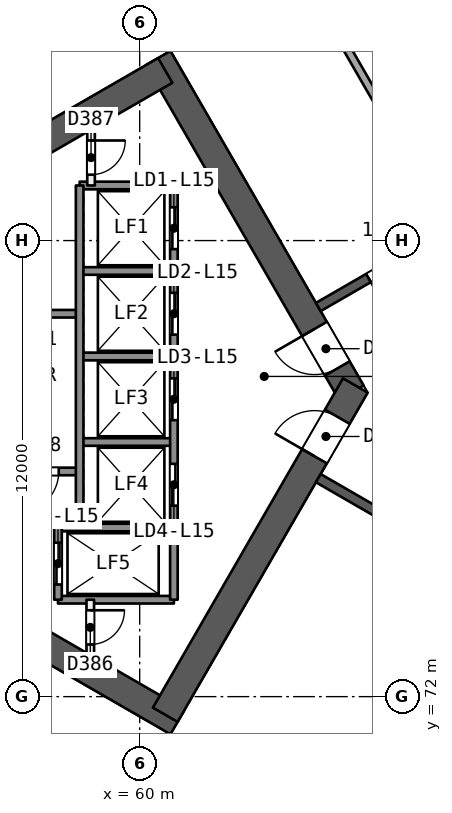
"""IFC4 building model, lengths in metres.
Left out: names, types, materials, properties, quantities, classifications, styles, units other than length and angle.
Written with IfcOpenShell. Run it as: python <this file> out.ifc"""

import sys

from ifc_helpers import new_model, si_unit, direction, frame, frame_2d, origin, place, context, subcontext, project, spatial, rectangle, extrude, element, fill, save


model = new_model("IFC4")
c1 = context("Model", 3, precision=1e-05, world=origin(), true_north=direction((0.0, 1.0)))
c2 = subcontext(c1, "Body", "Model", "MODEL_VIEW")
j1 = project(units=[si_unit("LENGTHUNIT", "METRE"), si_unit("PLANEANGLEUNIT", "RADIAN")], contexts=[c1])
p1 = place(None, origin())
s1 = spatial("IfcSite", under=j1, at=p1, CompositionType="ELEMENT")
p2 = place(p1, origin())
s2 = spatial("IfcBuilding", under=s1, at=p2, CompositionType="ELEMENT")
p3 = place(p2, frame((0.0, 0.0, 68.4)))
s3 = spatial("IfcBuildingStorey", under=s2, at=p3, CompositionType="ELEMENT", Elevation=68.4)
p4 = place(p3, frame((65.567, 80.0, 0.0), z_axis=(0.0, 0.0, 1.0), x_axis=(-0.499988615364, 0.866031976607, 0.0)))
e1 = element("IfcWall", 1, at=p4, inside=s3, PredefinedType="SHEAR", context=c2, shape_type="SweptSolid", body=[
    extrude(rectangle(XDim=10.163, YDim=0.75, at=frame_2d((5.082, 0.0))), origin(), (0.0, 0.0, 1.0), 3.7),
])
p5 = place(p4, frame((0.733, 0.0, 0.0)))
e2 = element("IfcOpeningElement", 2, at=p5, cuts=e1, PredefinedType="OPENING", context=c2, shape_type="SweptSolid", body=[
    extrude(rectangle(XDim=1.2, YDim=2.1, at=frame_2d((0.6, 1.05))), frame((0.0, 0.385, 0.0), z_axis=(0.0, -1.0, 0.0), x_axis=(1.0, 0.0, 0.0)), (0.0, 0.0, 1.0), 0.771),
])
p6 = place(p3, frame((60.673, 88.477, 0.0), z_axis=(0.0, 0.0, 1.0), x_axis=(-0.8660248072, -0.500001033313, 0.0)))
e3 = element("IfcWall", 3, at=p6, inside=s3, PredefinedType="SHEAR", context=c2, shape_type="SweptSolid", body=[
    extrude(rectangle(XDim=13.958, YDim=0.75, at=frame_2d((6.979, 0.0))), origin(), (0.0, 0.0, 1.0), 3.7),
])
p7 = place(p3, frame((48.772, 78.394, 0.0), z_axis=(0.0, 0.0, 1.0), x_axis=(0.866028339916, -0.499994914436, 0.0)))
e4 = element("IfcWall", 4, at=p7, inside=s3, PredefinedType="SHEAR", context=c2, shape_type="SweptSolid", body=[
    extrude(rectangle(XDim=14.117, YDim=0.75, at=frame_2d((7.059, 0.0))), origin(), (0.0, 0.0, 1.0), 3.7),
])
p8 = place(p3, frame((60.673, 71.523, 0.0), z_axis=(0.0, 0.0, 1.0), x_axis=(0.499997052475, 0.866027105532, 0.0)))
e5 = element("IfcWall", 5, at=p8, inside=s3, PredefinedType="SHEAR", context=c2, shape_type="SweptSolid", body=[
    extrude(rectangle(XDim=10.005, YDim=0.75, at=frame_2d((5.002, 0.0))), origin(), (0.0, 0.0, 1.0), 3.7),
])
p9 = place(p8, frame((7.855, 0.0, 0.0)))
e6 = element("IfcOpeningElement", 6, at=p9, cuts=e5, PredefinedType="OPENING", context=c2, shape_type="SweptSolid", body=[
    extrude(rectangle(XDim=1.2, YDim=2.1, at=frame_2d((0.6, 1.05))), frame((0.0, 0.385, 0.0), z_axis=(0.0, -1.0, 0.0), x_axis=(1.0, 0.0, 0.0)), (0.0, 0.0, 1.0), 0.771),
])
p10 = place(p3, frame((78.2, 90.046, 0.0), z_axis=(0.0, 0.0, 1.0), x_axis=(-0.866026492143, -0.499998114903, 0.0)))
e7 = element("IfcWall", 7, at=p10, inside=s3, PredefinedType="SHEAR", context=c2, shape_type="SweptSolid", body=[
    extrude(rectangle(XDim=15.588, YDim=0.25, at=frame_2d((7.794, 0.0))), origin(), (0.0, 0.0, 1.0), 3.2),
])
p11 = place(p10, frame((4.718, 0.0, 0.0)))
e8 = element("IfcOpeningElement", 8, at=p11, cuts=e7, PredefinedType="OPENING", context=c2, shape_type="SweptSolid", body=[
    extrude(rectangle(XDim=1.0, YDim=2.1, at=frame_2d((0.5, 1.05))), frame((0.0, 0.135, 0.0), z_axis=(0.0, -1.0, 0.0), x_axis=(1.0, 0.0, 0.0)), (0.0, 0.0, 1.0), 0.271),
])
p12 = place(p10, frame((9.785, 0.0, 0.0)))
e9 = element("IfcOpeningElement", 9, at=p12, cuts=e7, PredefinedType="OPENING", context=c2, shape_type="SweptSolid", body=[
    extrude(rectangle(XDim=1.1, YDim=2.1, at=frame_2d((0.55, 1.05))), frame((0.0, 0.135, 0.0), z_axis=(0.0, -1.0, 0.0), x_axis=(1.0, 0.0, 0.0)), (0.0, 0.0, 1.0), 0.271),
])
p13 = place(p10, frame((13.062, 0.0, 0.0)))
e10 = element("IfcOpeningElement", 10, at=p13, cuts=e7, PredefinedType="OPENING", context=c2, shape_type="SweptSolid", body=[
    extrude(rectangle(XDim=1.0, YDim=2.1, at=frame_2d((0.5, 1.05))), frame((0.0, 0.135, 0.0), z_axis=(0.0, -1.0, 0.0), x_axis=(1.0, 0.0, 0.0)), (0.0, 0.0, 1.0), 0.271),
])
p14 = place(p3, frame((64.7, 77.748, 0.0), z_axis=(0.0, 0.0, 1.0), x_axis=(0.866026492143, -0.499998114903, 0.0)))
e11 = element("IfcWall", 11, at=p14, inside=s3, PredefinedType="SHEAR", context=c2, shape_type="SweptSolid", body=[
    extrude(rectangle(XDim=15.588, YDim=0.25, at=frame_2d((7.794, 0.0))), origin(), (0.0, 0.0, 1.0), 3.2),
])
p15 = place(p14, frame((2.306, 0.0, 0.0)))
e12 = element("IfcOpeningElement", 12, at=p15, cuts=e11, PredefinedType="OPENING", context=c2, shape_type="SweptSolid", body=[
    extrude(rectangle(XDim=1.0, YDim=2.1, at=frame_2d((0.5, 1.05))), frame((0.0, 0.135, 0.0), z_axis=(0.0, -1.0, 0.0), x_axis=(1.0, 0.0, 0.0)), (0.0, 0.0, 1.0), 0.271),
])
p16 = place(p14, frame((8.003, 0.0, 0.0)))
e13 = element("IfcOpeningElement", 13, at=p16, cuts=e11, PredefinedType="OPENING", context=c2, shape_type="SweptSolid", body=[
    extrude(rectangle(XDim=1.1, YDim=2.1, at=frame_2d((0.55, 1.05))), frame((0.0, 0.135, 0.0), z_axis=(0.0, -1.0, 0.0), x_axis=(1.0, 0.0, 0.0)), (0.0, 0.0, 1.0), 0.271),
])
p17 = place(p14, frame((9.871, 0.0, 0.0)))
e14 = element("IfcOpeningElement", 14, at=p17, cuts=e11, PredefinedType="OPENING", context=c2, shape_type="SweptSolid", body=[
    extrude(rectangle(XDim=1.0, YDim=2.1, at=frame_2d((0.5, 1.05))), frame((0.0, 0.135, 0.0), z_axis=(0.0, -1.0, 0.0), x_axis=(1.0, 0.0, 0.0)), (0.0, 0.0, 1.0), 0.271),
])
for number, where, z_axis, x_axis in (
    (15, (66.062, 98.599, 0.0), (0.0, 0.0, 1.0), (0.5, -0.866, 0.0)),
    (16, (61.472, 95.948, 0.0), (0.0, 0.0, 1.0), (0.5, -0.866, 0.0)),
):
    element("IfcWall", number, at=place(p3, frame(where, z_axis=z_axis, x_axis=x_axis)), inside=s3, PredefinedType="PARTITIONING", context=c2, shape_type="SweptSolid", body=[
        extrude(rectangle(XDim=13.476, YDim=0.2, at=frame_2d((6.738, 0.0))), origin(), (0.0, 0.0, 1.0), 3.2),
    ])
p18 = place(p3, frame((62.822, 63.272, 0.0), z_axis=(0.0, 0.0, 1.0), x_axis=(0.50001657107, 0.866015836261, 0.0)))
e17 = element("IfcWall", 17, at=p18, inside=s3, PredefinedType="PARTITIONING", context=c2, shape_type="SweptSolid", body=[
    extrude(rectangle(XDim=9.413, YDim=0.2, at=frame_2d((4.707, 0.0))), origin(), (0.0, 0.0, 1.0), 3.2),
])
p19 = place(p3, frame((66.062, 61.401, 0.0), z_axis=(0.0, 0.0, 1.0), x_axis=(0.500006826849, 0.866021462265, 0.0)))
e18 = element("IfcWall", 18, at=p19, inside=s3, PredefinedType="PARTITIONING", context=c2, shape_type="SweptSolid", body=[
    extrude(rectangle(XDim=13.476, YDim=0.2, at=frame_2d((6.738, 0.0))), origin(), (0.0, 0.0, 1.0), 3.2),
])
p20 = place(p3, frame((38.832, 83.049, 0.0), z_axis=(0.0, 0.0, 1.0), x_axis=(0.866024382485, 0.500001768939, 0.0)))
e19 = element("IfcWall", 19, at=p20, inside=s3, PredefinedType="SOLIDWALL", context=c2, shape_type="SweptSolid", body=[
    extrude(rectangle(XDim=59.596, YDim=0.3, at=frame_2d((29.798, 0.0))), origin(), (0.0, 0.0, 1.0), 3.2),
])
p21 = place(p20, frame((27.507, 0.0, 0.0)))
e20 = element("IfcOpeningElement", 20, at=p21, cuts=e19, PredefinedType="OPENING", context=c2, shape_type="SweptSolid", body=[
    extrude(rectangle(XDim=2.4, YDim=2.4, at=frame_2d((1.2, 1.2))), frame((0.0, 0.161, 0.0), z_axis=(0.0, -1.0, 0.0), x_axis=(1.0, 0.0, 0.0)), (0.0, 0.0, 1.0), 0.321),
])
p22 = place(p20, frame((22.83, 0.0, 0.0)))
e21 = element("IfcOpeningElement", 21, at=p22, cuts=e19, PredefinedType="OPENING", context=c2, shape_type="SweptSolid", body=[
    extrude(rectangle(XDim=2.4, YDim=2.4, at=frame_2d((1.2, 1.2))), frame((0.0, 0.161, 0.0), z_axis=(0.0, -1.0, 0.0), x_axis=(1.0, 0.0, 0.0)), (0.0, 0.0, 1.0), 0.321),
])
p23 = place(p20, frame((10.995, 0.0, 0.0)))
e22 = element("IfcOpeningElement", 22, at=p23, cuts=e19, PredefinedType="OPENING", context=c2, shape_type="SweptSolid", body=[
    extrude(rectangle(XDim=2.4, YDim=2.4, at=frame_2d((1.2, 1.2))), frame((0.0, 0.161, 0.0), z_axis=(0.0, -1.0, 0.0), x_axis=(1.0, 0.0, 0.0)), (0.0, 0.0, 1.0), 0.321),
])
p24 = place(p20, frame((44.32, 0.0, 0.0)))
e23 = element("IfcOpeningElement", 23, at=p24, cuts=e19, PredefinedType="OPENING", context=c2, shape_type="SweptSolid", body=[
    extrude(rectangle(XDim=2.4, YDim=2.4, at=frame_2d((1.2, 1.2))), frame((0.0, 0.161, 0.0), z_axis=(0.0, -1.0, 0.0), x_axis=(1.0, 0.0, 0.0)), (0.0, 0.0, 1.0), 0.321),
])
p25 = place(p3, frame((90.443, 47.153, 0.0), z_axis=(0.0, 0.0, 1.0), x_axis=(-0.866024382485, 0.500001768939, 0.0)))
e24 = element("IfcWall", 24, at=p25, inside=s3, PredefinedType="SOLIDWALL", context=c2, shape_type="SweptSolid", body=[
    extrude(rectangle(XDim=59.596, YDim=0.3, at=frame_2d((29.798, 0.0))), origin(), (0.0, 0.0, 1.0), 3.2),
])
p26 = place(p25, frame((28.91, 0.0, 0.0)))
e25 = element("IfcOpeningElement", 25, at=p26, cuts=e24, PredefinedType="OPENING", context=c2, shape_type="SweptSolid", body=[
    extrude(rectangle(XDim=2.4, YDim=2.4, at=frame_2d((1.2, 1.2))), frame((0.0, 0.161, 0.0), z_axis=(0.0, -1.0, 0.0), x_axis=(1.0, 0.0, 0.0)), (0.0, 0.0, 1.0), 0.321),
])
p27 = place(p25, frame((33.586, 0.0, 0.0)))
e26 = element("IfcOpeningElement", 26, at=p27, cuts=e24, PredefinedType="OPENING", context=c2, shape_type="SweptSolid", body=[
    extrude(rectangle(XDim=2.4, YDim=2.4, at=frame_2d((1.2, 1.2))), frame((0.0, 0.161, 0.0), z_axis=(0.0, -1.0, 0.0), x_axis=(1.0, 0.0, 0.0)), (0.0, 0.0, 1.0), 0.321),
])
p28 = place(p25, frame((46.23, 0.0, 0.0)))
e27 = element("IfcOpeningElement", 27, at=p28, cuts=e24, PredefinedType="OPENING", context=c2, shape_type="SweptSolid", body=[
    extrude(rectangle(XDim=2.4, YDim=2.4, at=frame_2d((1.2, 1.2))), frame((0.0, 0.161, 0.0), z_axis=(0.0, -1.0, 0.0), x_axis=(1.0, 0.0, 0.0)), (0.0, 0.0, 1.0), 0.321),
])
p29 = place(p25, frame((12.876, 0.0, 0.0)))
e28 = element("IfcOpeningElement", 28, at=p29, cuts=e24, PredefinedType="OPENING", context=c2, shape_type="SweptSolid", body=[
    extrude(rectangle(XDim=2.4, YDim=2.4, at=frame_2d((1.2, 1.2))), frame((0.0, 0.161, 0.0), z_axis=(0.0, -1.0, 0.0), x_axis=(1.0, 0.0, 0.0)), (0.0, 0.0, 1.0), 0.321),
])
for number, where, z_axis, x_axis in (
    (29, (60.9, 85.45, 0.0), (0.0, 0.0, 1.0), (-1.0, 0.0, 0.0)),
    (30, (60.9, 83.2, 0.0), (0.0, 0.0, 1.0), (-1.0, 0.0, 0.0)),
):
    element("IfcWall", number, at=place(p3, frame(where, z_axis=z_axis, x_axis=x_axis)), inside=s3, PredefinedType="SOLIDWALL", context=c2, shape_type="SweptSolid", body=[
        extrude(rectangle(XDim=2.48, YDim=0.2, at=frame_2d((1.24, 0.0))), origin(), (0.0, 0.0, 1.0), 3.2),
    ])
p30 = place(p3, frame((58.42, 82.075, 0.0), z_axis=(0.0, 0.0, 1.0), x_axis=(-1.0, 0.0, 0.0)))
e31 = element("IfcWall", 31, at=p30, inside=s3, PredefinedType="SOLIDWALL", context=c2, shape_type="SweptSolid", body=[
    extrude(rectangle(XDim=7.7, YDim=0.2, at=frame_2d((3.85, 0.0))), origin(), (0.0, 0.0, 1.0), 3.2),
])
for number, where, z_axis, x_axis in (
    (32, (60.9, 80.95, 0.0), (0.0, 0.0, 1.0), (-1.0, 0.0, 0.0)),
    (33, (60.9, 78.7, 0.0), (0.0, 0.0, 1.0), (-1.0, 0.0, 0.0)),
):
    element("IfcWall", number, at=place(p3, frame(where, z_axis=z_axis, x_axis=x_axis)), inside=s3, PredefinedType="SOLIDWALL", context=c2, shape_type="SweptSolid", body=[
        extrude(rectangle(XDim=2.48, YDim=0.2, at=frame_2d((1.24, 0.0))), origin(), (0.0, 0.0, 1.0), 3.2),
    ])
p31 = place(p3, frame((58.42, 77.925, 0.0), z_axis=(0.0, 0.0, 1.0), x_axis=(-1.0, 0.0, 0.0)))
e34 = element("IfcWall", 34, at=p31, inside=s3, PredefinedType="SOLIDWALL", context=c2, shape_type="SweptSolid", body=[
    extrude(rectangle(XDim=7.7, YDim=0.2, at=frame_2d((3.85, 0.0))), origin(), (0.0, 0.0, 1.0), 3.2),
])
p32 = place(p31, frame((0.55, 0.0, 0.0)))
e35 = element("IfcOpeningElement", 35, at=p32, cuts=e34, PredefinedType="OPENING", context=c2, shape_type="SweptSolid", body=[
    extrude(rectangle(XDim=1.1, YDim=2.1, at=frame_2d((0.55, 1.05))), frame((0.0, 0.11, 0.0), z_axis=(0.0, -1.0, 0.0), x_axis=(1.0, 0.0, 0.0)), (0.0, 0.0, 1.0), 0.221),
])
for number, where, z_axis, x_axis in (
    (36, (60.9, 76.45, 0.0), (0.0, 0.0, 1.0), (-1.0, 0.0, 0.0)),
    (37, (60.9, 74.55, 0.0), (0.0, 0.0, 1.0), (-1.0, 0.0, 0.0)),
):
    element("IfcWall", number, at=place(p3, frame(where, z_axis=z_axis, x_axis=x_axis)), inside=s3, PredefinedType="SOLIDWALL", context=c2, shape_type="SweptSolid", body=[
        extrude(rectangle(XDim=3.05, YDim=0.2, at=frame_2d((1.525, 0.0))), origin(), (0.0, 0.0, 1.0), 3.2),
    ])
p33 = place(p3, frame((60.9, 85.45, 0.0), z_axis=(0.0, 0.0, 1.0), x_axis=(0.0, -1.0, 0.0)))
e38 = element("IfcWall", 38, at=p33, inside=s3, PredefinedType="SOLIDWALL", context=c2, shape_type="SweptSolid", body=[
    extrude(rectangle(XDim=10.9, YDim=0.2, at=frame_2d((5.45, 0.0))), origin(), (0.0, 0.0, 1.0), 3.2),
])
p34 = place(p33, frame((0.575, 0.0, 0.0)))
e39 = element("IfcOpeningElement", 39, at=p34, cuts=e38, PredefinedType="OPENING", context=c2, shape_type="SweptSolid", body=[
    extrude(rectangle(XDim=1.1, YDim=2.1, at=frame_2d((0.55, 1.05))), frame((0.0, 0.11, 0.0), z_axis=(0.0, -1.0, 0.0), x_axis=(1.0, 0.0, 0.0)), (0.0, 0.0, 1.0), 0.221),
])
p35 = place(p33, frame((2.825, 0.0, 0.0)))
e40 = element("IfcOpeningElement", 40, at=p35, cuts=e38, PredefinedType="OPENING", context=c2, shape_type="SweptSolid", body=[
    extrude(rectangle(XDim=1.1, YDim=2.1, at=frame_2d((0.55, 1.05))), frame((0.0, 0.11, 0.0), z_axis=(0.0, -1.0, 0.0), x_axis=(1.0, 0.0, 0.0)), (0.0, 0.0, 1.0), 0.221),
])
p36 = place(p33, frame((5.075, 0.0, 0.0)))
e41 = element("IfcOpeningElement", 41, at=p36, cuts=e38, PredefinedType="OPENING", context=c2, shape_type="SweptSolid", body=[
    extrude(rectangle(XDim=1.1, YDim=2.1, at=frame_2d((0.55, 1.05))), frame((0.0, 0.11, 0.0), z_axis=(0.0, -1.0, 0.0), x_axis=(1.0, 0.0, 0.0)), (0.0, 0.0, 1.0), 0.221),
])
p37 = place(p33, frame((7.325, 0.0, 0.0)))
e42 = element("IfcOpeningElement", 42, at=p37, cuts=e38, PredefinedType="OPENING", context=c2, shape_type="SweptSolid", body=[
    extrude(rectangle(XDim=1.1, YDim=2.1, at=frame_2d((0.55, 1.05))), frame((0.0, 0.11, 0.0), z_axis=(0.0, -1.0, 0.0), x_axis=(1.0, 0.0, 0.0)), (0.0, 0.0, 1.0), 0.221),
])
p38 = place(p3, frame((58.72, 86.917, 0.0), z_axis=(0.0, 0.0, 1.0), x_axis=(0.0, -1.0, 0.0)))
e43 = element("IfcWall", 43, at=p38, inside=s3, PredefinedType="PARTITIONING", context=c2, shape_type="SweptSolid", body=[
    extrude(rectangle(XDim=1.467, YDim=0.2, at=frame_2d((0.733, 0.0))), origin(), (0.0, 0.0, 1.0), 3.2),
])
p39 = place(p38, frame((0.283, 0.0, 0.0)))
e44 = element("IfcOpeningElement", 44, at=p39, cuts=e43, PredefinedType="OPENING", context=c2, shape_type="SweptSolid", body=[
    extrude(rectangle(XDim=0.9, YDim=2.1, at=frame_2d((0.45, 1.05))), frame((0.0, 0.11, 0.0), z_axis=(0.0, -1.0, 0.0), x_axis=(1.0, 0.0, 0.0)), (0.0, 0.0, 1.0), 0.221),
])
p40 = place(p3, frame((58.7, 74.55, 0.0), z_axis=(0.0, 0.0, 1.0), x_axis=(0.0, -1.0, 0.0)))
e45 = element("IfcWall", 45, at=p40, inside=s3, PredefinedType="PARTITIONING", context=c2, shape_type="SweptSolid", body=[
    extrude(rectangle(XDim=1.455, YDim=0.2, at=frame_2d((0.728, 0.0))), origin(), (0.0, 0.0, 1.0), 3.2),
])
p41 = place(p40, frame((0.278, 0.0, 0.0)))
e46 = element("IfcOpeningElement", 46, at=p41, cuts=e45, PredefinedType="OPENING", context=c2, shape_type="SweptSolid", body=[
    extrude(rectangle(XDim=0.9, YDim=2.1, at=frame_2d((0.45, 1.05))), frame((0.0, 0.11, 0.0), z_axis=(0.0, -1.0, 0.0), x_axis=(1.0, 0.0, 0.0)), (0.0, 0.0, 1.0), 0.221),
])
p42 = place(p3, frame((58.42, 85.45, 0.0), z_axis=(0.0, 0.0, 1.0), x_axis=(0.0, -1.0, 0.0)))
e47 = element("IfcWall", 47, at=p42, inside=s3, PredefinedType="SOLIDWALL", context=c2, shape_type="SweptSolid", body=[
    extrude(rectangle(XDim=9.0, YDim=0.2, at=frame_2d((4.5, 0.0))), origin(), (0.0, 0.0, 1.0), 3.2),
])
p43 = place(p3, frame((57.85, 76.45, 0.0), z_axis=(0.0, 0.0, 1.0), x_axis=(0.0, -1.0, 0.0)))
e48 = element("IfcWall", 48, at=p43, inside=s3, PredefinedType="SOLIDWALL", context=c2, shape_type="SweptSolid", body=[
    extrude(rectangle(XDim=1.9, YDim=0.2, at=frame_2d((0.95, 0.0))), origin(), (0.0, 0.0, 1.0), 3.2),
])
p44 = place(p43, frame((0.4, 0.0, 0.0)))
e49 = element("IfcOpeningElement", 49, at=p44, cuts=e48, PredefinedType="OPENING", context=c2, shape_type="SweptSolid", body=[
    extrude(rectangle(XDim=1.1, YDim=2.1, at=frame_2d((0.55, 1.05))), frame((0.0, 0.11, 0.0), z_axis=(0.0, -1.0, 0.0), x_axis=(1.0, 0.0, 0.0)), (0.0, 0.0, 1.0), 0.221),
])
p45 = place(p13, origin())
e50 = element("IfcDoor", 50, at=p45, inside=s3, OperationType="SINGLE_SWING_RIGHT", PredefinedType="NOTDEFINED", context=c2, shape_type="SweptSolid", body=[
    extrude(rectangle(XDim=1.0, YDim=2.1, at=frame_2d((0.5, 1.05))), frame((0.0, 0.025, 0.0), z_axis=(0.0, -1.0, 0.0), x_axis=(1.0, 0.0, 0.0)), (0.0, 0.0, 1.0), 0.05),
])
fill(e10, e50)
p46 = place(p5, origin())
e51 = element("IfcDoor", 51, at=p46, inside=s3, OperationType="SINGLE_SWING_RIGHT", PredefinedType="NOTDEFINED", context=c2, shape_type="SweptSolid", body=[
    extrude(rectangle(XDim=1.2, YDim=2.1, at=frame_2d((0.6, 1.05))), frame((0.0, 0.025, 0.0), z_axis=(0.0, -1.0, 0.0), x_axis=(1.0, 0.0, 0.0)), (0.0, 0.0, 1.0), 0.05),
])
fill(e2, e51)
p47 = place(p9, origin())
e52 = element("IfcDoor", 52, at=p47, inside=s3, OperationType="SINGLE_SWING_LEFT", PredefinedType="NOTDEFINED", context=c2, shape_type="SweptSolid", body=[
    extrude(rectangle(XDim=1.2, YDim=2.1, at=frame_2d((0.6, 1.05))), frame((0.0, 0.025, 0.0), z_axis=(0.0, -1.0, 0.0), x_axis=(1.0, 0.0, 0.0)), (0.0, 0.0, 1.0), 0.05),
])
fill(e6, e52)
p48 = place(p34, origin())
e53 = element("IfcDoor", 53, at=p48, inside=s3, OperationType="SLIDING_TO_RIGHT", PredefinedType="NOTDEFINED", context=c2, shape_type="SweptSolid", body=[
    extrude(rectangle(XDim=1.1, YDim=2.1, at=frame_2d((0.55, 1.05))), frame((0.0, 0.025, 0.0), z_axis=(0.0, -1.0, 0.0), x_axis=(1.0, 0.0, 0.0)), (0.0, 0.0, 1.0), 0.05),
])
fill(e39, e53)
p49 = place(p35, origin())
e54 = element("IfcDoor", 54, at=p49, inside=s3, OperationType="SLIDING_TO_LEFT", PredefinedType="NOTDEFINED", context=c2, shape_type="SweptSolid", body=[
    extrude(rectangle(XDim=1.1, YDim=2.1, at=frame_2d((0.55, 1.05))), frame((0.0, 0.025, 0.0), z_axis=(0.0, -1.0, 0.0), x_axis=(1.0, 0.0, 0.0)), (0.0, 0.0, 1.0), 0.05),
])
fill(e40, e54)
p50 = place(p36, origin())
e55 = element("IfcDoor", 55, at=p50, inside=s3, OperationType="SLIDING_TO_RIGHT", PredefinedType="NOTDEFINED", context=c2, shape_type="SweptSolid", body=[
    extrude(rectangle(XDim=1.1, YDim=2.1, at=frame_2d((0.55, 1.05))), frame((0.0, 0.025, 0.0), z_axis=(0.0, -1.0, 0.0), x_axis=(1.0, 0.0, 0.0)), (0.0, 0.0, 1.0), 0.05),
])
fill(e41, e55)
p51 = place(p37, origin())
e56 = element("IfcDoor", 56, at=p51, inside=s3, OperationType="SLIDING_TO_LEFT", PredefinedType="NOTDEFINED", context=c2, shape_type="SweptSolid", body=[
    extrude(rectangle(XDim=1.1, YDim=2.1, at=frame_2d((0.55, 1.05))), frame((0.0, 0.025, 0.0), z_axis=(0.0, -1.0, 0.0), x_axis=(1.0, 0.0, 0.0)), (0.0, 0.0, 1.0), 0.05),
])
fill(e42, e56)
p52 = place(p44, origin())
e57 = element("IfcDoor", 57, at=p52, inside=s3, OperationType="SLIDING_TO_RIGHT", PredefinedType="NOTDEFINED", context=c2, shape_type="SweptSolid", body=[
    extrude(rectangle(XDim=1.1, YDim=2.1, at=frame_2d((0.55, 1.05))), frame((0.0, 0.025, 0.0), z_axis=(0.0, -1.0, 0.0), x_axis=(1.0, 0.0, 0.0)), (0.0, 0.0, 1.0), 0.05),
])
fill(e49, e57)
p53 = place(p41, origin())
e58 = element("IfcDoor", 58, at=p53, inside=s3, OperationType="SINGLE_SWING_LEFT", PredefinedType="NOTDEFINED", context=c2, shape_type="SweptSolid", body=[
    extrude(rectangle(XDim=0.9, YDim=2.1, at=frame_2d((0.45, 1.05))), frame((0.0, 0.025, 0.0), z_axis=(0.0, -1.0, 0.0), x_axis=(1.0, 0.0, 0.0)), (0.0, 0.0, 1.0), 0.05),
])
fill(e46, e58)
p54 = place(p39, origin())
e59 = element("IfcDoor", 59, at=p54, inside=s3, OperationType="SINGLE_SWING_LEFT", PredefinedType="NOTDEFINED", context=c2, shape_type="SweptSolid", body=[
    extrude(rectangle(XDim=0.9, YDim=2.1, at=frame_2d((0.45, 1.05))), frame((0.0, 0.025, 0.0), z_axis=(0.0, -1.0, 0.0), x_axis=(1.0, 0.0, 0.0)), (0.0, 0.0, 1.0), 0.05),
])
fill(e44, e59)
p55 = place(p32, origin())
e60 = element("IfcDoor", 60, at=p55, inside=s3, OperationType="SINGLE_SWING_RIGHT", PredefinedType="NOTDEFINED", context=c2, shape_type="SweptSolid", body=[
    extrude(rectangle(XDim=1.1, YDim=2.1, at=frame_2d((0.55, 1.05))), frame((0.0, 0.025, 0.0), z_axis=(0.0, -1.0, 0.0), x_axis=(1.0, 0.0, 0.0)), (0.0, 0.0, 1.0), 0.05),
])
fill(e35, e60)
save(model, sys.argv[1])
